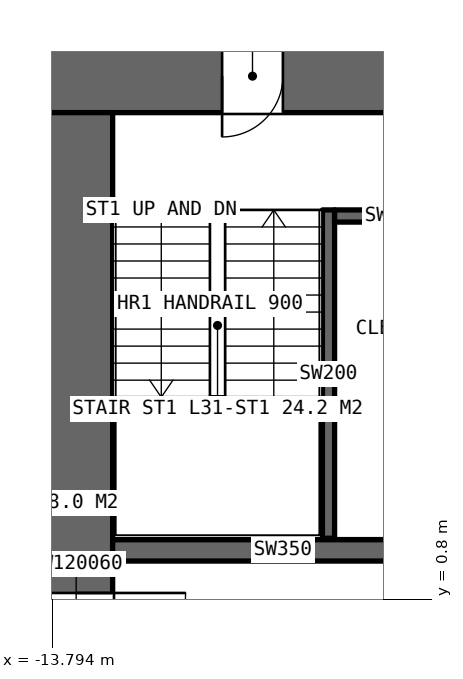
"""IFC4 building model, lengths in metres.
Left out: names, types, materials, properties, quantities, classifications, styles, units other than length and angle.
Written with IfcOpenShell. Run it as: python <this file> out.ifc"""

import sys

from ifc_helpers import new_model, si_unit, direction, frame, frame_2d, origin, place, context, subcontext, project, spatial, rectangle, extrude, element, fill, save


model = new_model("IFC4")
c1 = context("Model", 3, precision=1e-05, world=origin(), true_north=direction((0.0, 1.0)))
c2 = subcontext(c1, "Body", "Model", "MODEL_VIEW")
j1 = project(units=[si_unit("LENGTHUNIT", "METRE"), si_unit("PLANEANGLEUNIT", "RADIAN")], contexts=[c1])
p1 = place(None, origin())
s1 = spatial("IfcSite", under=j1, at=p1, CompositionType="ELEMENT")
p2 = place(p1, origin())
s2 = spatial("IfcBuilding", under=s1, at=p2, CompositionType="ELEMENT")
p3 = place(p2, frame((0.0, 0.0, 147.0)))
s3 = spatial("IfcBuildingStorey", under=s2, at=p3, CompositionType="ELEMENT", Elevation=147.0)
p4 = place(p3, frame((14.0, 9.4, 0.0), z_axis=(0.0, 0.0, 1.0), x_axis=(-1.0, 0.0, 0.0)))
e1 = element("IfcWall", 1, at=p4, inside=s3, PredefinedType="SHEAR", context=c2, shape_type="SweptSolid", body=[
    extrude(rectangle(XDim=28.0, YDim=1.2, at=frame_2d((14.0, 0.0))), origin(), (0.0, 0.0, 1.0), 4.2),
])
p5 = place(p4, frame((24.0, 0.0, 0.0)))
e2 = element("IfcOpeningElement", 2, at=p5, cuts=e1, PredefinedType="OPENING", context=c2, shape_type="SweptSolid", body=[
    extrude(rectangle(XDim=1.0, YDim=2.4, at=frame_2d((0.5, 1.2))), frame((0.0, 0.61, 0.0), z_axis=(0.0, -1.0, 0.0), x_axis=(1.0, 0.0, 0.0)), (0.0, 0.0, 1.0), 1.22),
])
p6 = place(p4, frame((13.1, 0.0, 0.0)))
e3 = element("IfcOpeningElement", 3, at=p6, cuts=e1, PredefinedType="OPENING", context=c2, shape_type="SweptSolid", body=[
    extrude(rectangle(XDim=1.8, YDim=2.4, at=frame_2d((0.9, 1.2))), frame((0.0, 0.61, 0.0), z_axis=(0.0, -1.0, 0.0), x_axis=(1.0, 0.0, 0.0)), (0.0, 0.0, 1.0), 1.22),
])
p7 = place(p3, frame((-13.4, 8.8, 0.0), z_axis=(0.0, 0.0, 1.0), x_axis=(0.0, -1.0, 0.0)))
e4 = element("IfcWall", 4, at=p7, inside=s3, PredefinedType="SHEAR", context=c2, shape_type="SweptSolid", body=[
    extrude(rectangle(XDim=17.6, YDim=1.2, at=frame_2d((8.8, 0.0))), origin(), (0.0, 0.0, 1.0), 4.2),
])
p8 = place(p7, frame((7.9, 0.0, 0.0)))
e5 = element("IfcOpeningElement", 5, at=p8, cuts=e4, PredefinedType="OPENING", context=c2, shape_type="SweptSolid", body=[
    extrude(rectangle(XDim=1.8, YDim=2.4, at=frame_2d((0.9, 1.2))), frame((0.0, 0.61, 0.0), z_axis=(0.0, -1.0, 0.0), x_axis=(1.0, 0.0, 0.0)), (0.0, 0.0, 1.0), 1.22),
])
p9 = place(p7, frame((16.5, 0.0, 0.0)))
e6 = element("IfcOpeningElement", 6, at=p9, cuts=e4, PredefinedType="OPENING", context=c2, shape_type="SweptSolid", body=[
    extrude(rectangle(XDim=1.0, YDim=2.4, at=frame_2d((0.5, 1.2))), frame((0.0, 0.61, 0.0), z_axis=(0.0, -1.0, 0.0), x_axis=(1.0, 0.0, 0.0)), (0.0, 0.0, 1.0), 1.22),
])
p10 = place(p3, frame((-12.8, 1.6, 0.0), z_axis=(0.0, 0.0, 1.0), x_axis=(1.0, 0.0, 0.0)))
e7 = element("IfcWall", 7, at=p10, inside=s3, PredefinedType="SHEAR", context=c2, shape_type="SweptSolid", body=[
    extrude(rectangle(XDim=5.6, YDim=0.35, at=frame_2d((2.8, 0.0))), origin(), (0.0, 0.0, 1.0), 4.2),
])
p11 = place(p3, frame((-9.25, 7.2, 0.0), z_axis=(0.0, 0.0, 1.0), x_axis=(0.0, -1.0, 0.0)))
e8 = element("IfcWall", 8, at=p11, inside=s3, PredefinedType="SOLIDWALL", context=c2, shape_type="SweptSolid", body=[
    extrude(rectangle(XDim=5.4, YDim=0.2, at=frame_2d((2.7, 0.0))), origin(), (0.0, 0.0, 1.0), 4.2),
])
p12 = place(p3, frame((-9.15, 7.1, 0.0), z_axis=(0.0, 0.0, 1.0), x_axis=(1.0, 0.0, 0.0)))
e9 = element("IfcWall", 9, at=p12, inside=s3, PredefinedType="SOLIDWALL", context=c2, shape_type="SweptSolid", body=[
    extrude(rectangle(XDim=1.95, YDim=0.2, at=frame_2d((0.975, 0.0))), origin(), (0.0, 0.0, 1.0), 4.2),
])
p13 = place(p8, origin())
e10 = element("IfcDoor", 10, at=p13, inside=s3, OperationType="DOUBLE_DOOR_SINGLE_SWING", PredefinedType="DOOR", context=c2, shape_type="SweptSolid", body=[
    extrude(rectangle(XDim=1.8, YDim=2.4, at=frame_2d((0.9, 1.2))), frame((0.0, 0.025, 0.0), z_axis=(0.0, -1.0, 0.0), x_axis=(1.0, 0.0, 0.0)), (0.0, 0.0, 1.0), 0.05),
])
fill(e5, e10)
p14 = place(p5, origin())
e11 = element("IfcDoor", 11, at=p14, inside=s3, OperationType="SINGLE_SWING_RIGHT", PredefinedType="DOOR", context=c2, shape_type="SweptSolid", body=[
    extrude(rectangle(XDim=1.0, YDim=2.4, at=frame_2d((0.5, 1.2))), frame((0.0, 0.025, 0.0), z_axis=(0.0, -1.0, 0.0), x_axis=(1.0, 0.0, 0.0)), (0.0, 0.0, 1.0), 0.05),
])
fill(e2, e11)
save(model, sys.argv[1])
